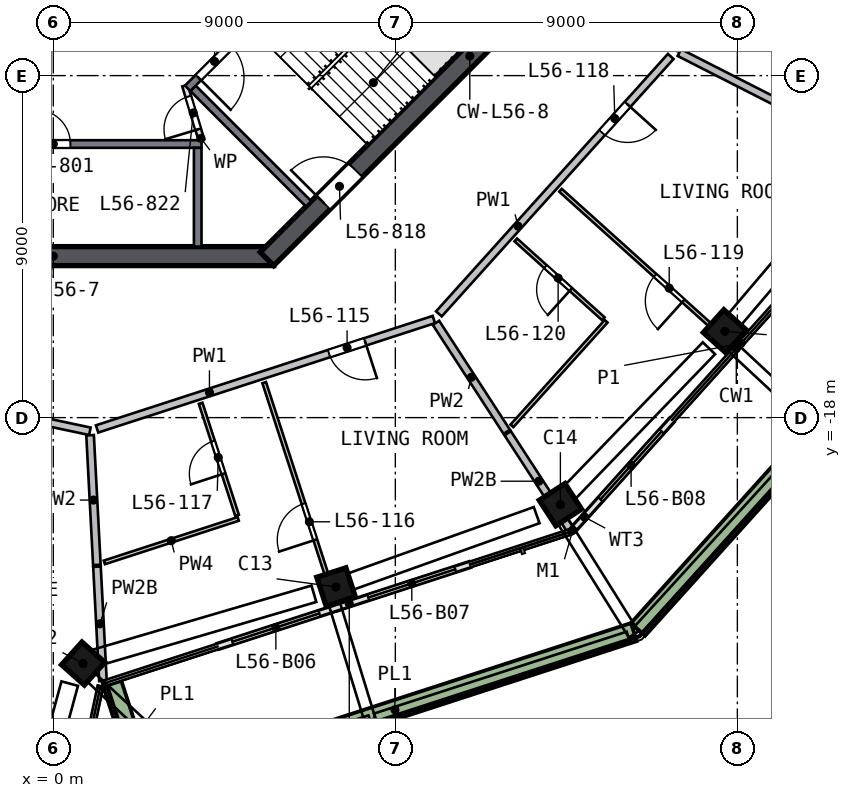
"""IFC4 building model, lengths in metres.
Left out: names, types, materials, properties, quantities, classifications, styles, units other than length and angle.
Written with IfcOpenShell. Run it as: python <this file> out.ifc"""

import sys

from ifc_helpers import new_model, si_unit, direction, frame, frame_2d, origin, origin_2d, place, context, subcontext, project, spatial, rectangle, extrude, element, fill, save


model = new_model("IFC4")
c1 = context("Model", 3, precision=1e-05, world=origin(), true_north=direction((0.0, 1.0)))
c2 = subcontext(c1, "Body", "Model", "MODEL_VIEW")
j1 = project(units=[si_unit("LENGTHUNIT", "METRE"), si_unit("PLANEANGLEUNIT", "RADIAN")], contexts=[c1])
p1 = place(None, origin())
s1 = spatial("IfcSite", under=j1, at=p1, CompositionType="ELEMENT")
p2 = place(p1, origin())
s2 = spatial("IfcBuilding", under=s1, at=p2, CompositionType="ELEMENT")
p3 = place(p2, frame((0.0, 0.0, 230.5)))
s3 = spatial("IfcBuildingStorey", under=s2, at=p3, CompositionType="ELEMENT", Elevation=230.5)
p4 = place(p3, frame((0.645, -24.477, 0.0), z_axis=(0.116377199, 0.004028734, 0.993196917), x_axis=(-0.661978405, -0.745177772, 0.080589573)))
e1 = element("IfcColumn", 1, at=p4, inside=s3, PredefinedType="COLUMN", context=c2, shape_type="SweptSolid", body=[
    extrude(rectangle(XDim=0.8, YDim=0.8, at=origin_2d()), origin(), (0.0, 0.0, 1.0), 3.212),
])
p5 = place(p3, frame((7.311, -22.5, 0.0), z_axis=(0.106771447, 0.03566653, 0.993643677), x_axis=(0.945089515, 0.306813406, -0.112567057)))
e2 = element("IfcColumn", 2, at=p5, inside=s3, PredefinedType="COLUMN", context=c2, shape_type="SweptSolid", body=[
    extrude(rectangle(XDim=0.8, YDim=0.8, at=origin_2d()), origin(), (0.0, 0.0, 1.0), 3.21),
])
p6 = place(p3, frame((13.227, -20.368, 0.0), z_axis=(0.096319996, 0.063782539, 0.99330471), x_axis=(-0.83281179, -0.541368375, 0.115519716)))
e3 = element("IfcColumn", 3, at=p6, inside=s3, PredefinedType="COLUMN", context=c2, shape_type="SweptSolid", body=[
    extrude(rectangle(XDim=0.8, YDim=0.8, at=origin_2d()), origin(), (0.0, 0.0, 1.0), 3.211),
])
p7 = place(p3, frame((17.582, -15.831, 0.0), z_axis=(0.074603375, 0.084261508, 0.993646987), x_axis=(0.664972628, 0.738340463, -0.112537837)))
e4 = element("IfcColumn", 4, at=p7, inside=s3, PredefinedType="COLUMN", context=c2, shape_type="SweptSolid", body=[
    extrude(rectangle(XDim=0.8, YDim=0.8, at=origin_2d()), origin(), (0.0, 0.0, 1.0), 3.21),
])
p8 = place(p3, frame((-5.799, -13.75, 0.0), z_axis=(0.0, 0.0, 1.0), x_axis=(1.0, 0.0, 0.0)))
e5 = element("IfcWall", 5, at=p8, inside=s3, PredefinedType="SHEAR", context=c2, shape_type="SweptSolid", body=[
    extrude(rectangle(XDim=11.598, YDim=0.5, at=frame_2d((5.799, 0.0))), origin(), (0.0, 0.0, 1.0), 3.5),
])
p9 = place(p3, frame((5.622, -13.823, 0.0), z_axis=(0.0, 0.0, 1.0), x_axis=(0.707106781, 0.707106781, 0.0)))
e6 = element("IfcWall", 6, at=p9, inside=s3, PredefinedType="SHEAR", context=c2, shape_type="SweptSolid", body=[
    extrude(rectangle(XDim=11.598, YDim=0.5, at=frame_2d((5.799, 0.0))), origin(), (0.0, 0.0, 1.0), 3.5),
])
p10 = place(p9, frame((2.099, 0.0, 0.0)))
e7 = element("IfcOpeningElement", 7, at=p10, cuts=e6, PredefinedType="OPENING", context=c2, shape_type="SweptSolid", body=[
    extrude(rectangle(XDim=1.2, YDim=2.1, at=frame_2d((0.6, 1.05))), frame((0.0, 0.26, 0.0), z_axis=(0.0, -1.0, 0.0), x_axis=(1.0, 0.0, 0.0)), (0.0, 0.0, 1.0), 0.52),
])
p11 = place(p3, frame((4.334, -24.02, 0.0), z_axis=(0.0, 0.0, 1.0), x_axis=(0.95106016, 0.309005779, 0.0)))
e8 = element("IfcWall", 8, at=p11, inside=s3, PredefinedType="SOLIDWALL", context=c2, shape_type="SweptSolid", body=[
    extrude(rectangle(XDim=3.3, YDim=0.15, at=frame_2d((1.65, 0.0))), origin(), (0.0, 0.0, 1.0), 2.525),
])
p12 = place(p11, frame((0.4, 0.0, 0.0)))
e9 = element("IfcOpeningElement", 9, at=p12, cuts=e8, PredefinedType="OPENING", context=c2, shape_type="SweptSolid", body=[
    extrude(rectangle(XDim=2.4, YDim=2.4, at=frame_2d((1.2, 1.2))), frame((0.0, 0.085, 0.0), z_axis=(0.0, -1.0, 0.0), x_axis=(1.0, 0.0, 0.0)), (0.0, 0.0, 1.0), 0.17),
])
p13 = place(p3, frame((7.473, -23.0, 0.0), z_axis=(0.0, 0.0, 1.0), x_axis=(0.951056609, 0.30901671, 0.0)))
e10 = element("IfcWall", 10, at=p13, inside=s3, PredefinedType="SOLIDWALL", context=c2, shape_type="SweptSolid", body=[
    extrude(rectangle(XDim=3.661, YDim=0.15, at=frame_2d((1.831, 0.0))), origin(), (0.0, 0.0, 1.0), 2.525),
])
p14 = place(p13, frame((0.861, 0.0, 0.0)))
e11 = element("IfcOpeningElement", 11, at=p14, cuts=e10, PredefinedType="OPENING", context=c2, shape_type="SweptSolid", body=[
    extrude(rectangle(XDim=2.4, YDim=2.4, at=frame_2d((1.2, 1.2))), frame((0.0, 0.085, 0.0), z_axis=(0.0, -1.0, 0.0), x_axis=(1.0, 0.0, 0.0)), (0.0, 0.0, 1.0), 0.17),
])
p15 = place(p3, frame((13.689, -20.938, 0.0), z_axis=(0.0, 0.0, 1.0), x_axis=(0.669135801, 0.743140148, 0.0)))
e12 = element("IfcWall", 12, at=p15, inside=s3, PredefinedType="SOLIDWALL", context=c2, shape_type="SweptSolid", body=[
    extrude(rectangle(XDim=3.863, YDim=0.15, at=frame_2d((1.932, 0.0))), origin(), (0.0, 0.0, 1.0), 2.525),
])
p16 = place(p15, frame((1.063, 0.0, 0.0)))
e13 = element("IfcOpeningElement", 13, at=p16, cuts=e12, PredefinedType="OPENING", context=c2, shape_type="SweptSolid", body=[
    extrude(rectangle(XDim=2.4, YDim=2.4, at=frame_2d((1.2, 1.2))), frame((0.0, 0.085, 0.0), z_axis=(0.0, -1.0, 0.0), x_axis=(1.0, 0.0, 0.0)), (0.0, 0.0, 1.0), 0.17),
])
p17 = place(p3, frame((1.552, -25.003, 0.0), z_axis=(0.0, 0.0, 1.0), x_axis=(0.309006691, -0.951059864, 0.0)))
e14 = element("IfcWall", 14, at=p17, inside=s3, PredefinedType="SOLIDWALL", context=c2, shape_type="SweptSolid", body=[
    extrude(rectangle(XDim=3.199, YDim=0.5, at=frame_2d((1.6, 0.0))), origin(), (0.0, 0.0, 1.0), 0.7),
])
p18 = place(p3, frame((2.701, -27.731, 0.0), z_axis=(0.0, 0.0, 1.0), x_axis=(0.951059708, 0.30900717, 0.0)))
e15 = element("IfcWall", 15, at=p18, inside=s3, PredefinedType="SOLIDWALL", context=c2, shape_type="SweptSolid", body=[
    extrude(rectangle(XDim=13.224, YDim=0.5, at=frame_2d((6.612, 0.0))), origin(), (0.0, 0.0, 1.0), 0.7),
])
p19 = place(p3, frame((15.386, -23.574, 0.0), z_axis=(0.0, 0.0, 1.0), x_axis=(0.669134751, 0.743141094, 0.0)))
e16 = element("IfcWall", 16, at=p19, inside=s3, PredefinedType="SOLIDWALL", context=c2, shape_type="SweptSolid", body=[
    extrude(rectangle(XDim=13.723, YDim=0.5, at=frame_2d((6.862, 0.0))), origin(), (0.0, 0.0, 1.0), 0.7),
])
p20 = place(p3, frame((-3.9, -10.8, 0.0), z_axis=(0.0, 0.0, 1.0), x_axis=(1.0, 0.0, 0.0)))
e17 = element("IfcWall", 17, at=p20, inside=s3, PredefinedType="SOLIDWALL", context=c2, shape_type="SweptSolid", body=[
    extrude(rectangle(XDim=7.8, YDim=0.2, at=frame_2d((3.9, 0.0))), origin(), (0.0, 0.0, 1.0), 3.19),
])
p21 = place(p20, frame((3.45, 0.0, 0.0)))
e18 = element("IfcOpeningElement", 18, at=p21, cuts=e17, PredefinedType="OPENING", context=c2, shape_type="SweptSolid", body=[
    extrude(rectangle(XDim=0.9, YDim=2.1, at=frame_2d((0.45, 1.05))), frame((0.0, 0.11, 0.0), z_axis=(0.0, -1.0, 0.0), x_axis=(1.0, 0.0, 0.0)), (0.0, 0.0, 1.0), 0.22),
])
p22 = place(p3, frame((3.8, -10.9, 0.0), z_axis=(0.0, 0.0, 1.0), x_axis=(0.0, -1.0, 0.0)))
e19 = element("IfcWall", 19, at=p22, inside=s3, PredefinedType="SOLIDWALL", context=c2, shape_type="SweptSolid", body=[
    extrude(rectangle(XDim=2.6, YDim=0.2, at=frame_2d((1.3, 0.0))), origin(), (0.0, 0.0, 1.0), 3.19),
])
p23 = place(p3, frame((9.629, -3.24, 0.0), z_axis=(0.0, 0.0, 1.0), x_axis=(-0.707120946, -0.707092617, 0.0)))
e20 = element("IfcWall", 20, at=p23, inside=s3, PredefinedType="SOLIDWALL", context=c2, shape_type="SweptSolid", body=[
    extrude(rectangle(XDim=8.618, YDim=0.2, at=frame_2d((4.309, 0.0))), origin(), (0.0, 0.0, 1.0), 3.19),
])
p24 = place(p23, frame((7.018, 0.0, 0.0)))
e21 = element("IfcOpeningElement", 21, at=p24, cuts=e20, PredefinedType="OPENING", context=c2, shape_type="SweptSolid", body=[
    extrude(rectangle(XDim=1.2, YDim=2.1, at=frame_2d((0.6, 1.05))), frame((0.0, 0.11, 0.0), z_axis=(0.0, -1.0, 0.0), x_axis=(1.0, 0.0, 0.0)), (0.0, 0.0, 1.0), 0.22),
])
p25 = place(p3, frame((3.677, -9.334, 0.0), z_axis=(0.0, 0.0, 1.0), x_axis=(0.707078393, -0.707135168, 0.0)))
e22 = element("IfcWall", 22, at=p25, inside=s3, PredefinedType="SOLIDWALL", context=c2, shape_type="SweptSolid", body=[
    extrude(rectangle(XDim=4.3, YDim=0.2, at=frame_2d((2.15, 0.0))), origin(), (0.0, 0.0, 1.0), 3.19),
])
p26 = place(p3, frame((3.9, -10.7, 0.0), z_axis=(0.0, 0.0, 1.0), x_axis=(-0.289808785, 0.957084567, 0.0)))
e23 = element("IfcWall", 23, at=p26, inside=s3, PredefinedType="PARTITIONING", context=c2, shape_type="SweptSolid", body=[
    extrude(rectangle(XDim=1.501, YDim=0.15, at=frame_2d((0.75, 0.0))), origin(), (0.0, 0.0, 1.0), 3.19),
])
p27 = place(p26, frame((0.301, 0.0, 0.0)))
e24 = element("IfcOpeningElement", 24, at=p27, cuts=e23, PredefinedType="OPENING", context=c2, shape_type="SweptSolid", body=[
    extrude(rectangle(XDim=0.9, YDim=2.1, at=frame_2d((0.45, 1.05))), frame((0.0, 0.085, 0.0), z_axis=(0.0, -1.0, 0.0), x_axis=(1.0, 0.0, 0.0)), (0.0, 0.0, 1.0), 0.17),
])
p28 = place(p3, frame((0.962, -18.36, 0.0), z_axis=(0.0, 0.0, 1.0), x_axis=(-0.978149461, 0.207902938, 0.0)))
e25 = element("IfcWall", 25, at=p28, inside=s3, PredefinedType="SOLIDWALL", context=c2, shape_type="SweptSolid", body=[
    extrude(rectangle(XDim=9.517, YDim=0.2, at=frame_2d((4.758, 0.0))), origin(), (0.0, 0.0, 1.0), 3.19),
])
p29 = place(p28, frame((3.84, 0.0, 0.0)))
e26 = element("IfcOpeningElement", 26, at=p29, cuts=e25, PredefinedType="OPENING", context=c2, shape_type="SweptSolid", body=[
    extrude(rectangle(XDim=1.8, YDim=2.1, at=frame_2d((0.9, 1.05))), frame((0.0, 0.11, 0.0), z_axis=(0.0, -1.0, 0.0), x_axis=(1.0, 0.0, 0.0)), (0.0, 0.0, 1.0), 0.22),
])
p30 = place(p3, frame((10.013, -15.419, 0.0), z_axis=(0.0, 0.0, 1.0), x_axis=(-0.951053709, -0.309025635, 0.0)))
e27 = element("IfcWall", 27, at=p30, inside=s3, PredefinedType="SOLIDWALL", context=c2, shape_type="SweptSolid", body=[
    extrude(rectangle(XDim=9.317, YDim=0.2, at=frame_2d((4.658, 0.0))), origin(), (0.0, 0.0, 1.0), 3.19),
])
p31 = place(p30, frame((1.9, 0.0, 0.0)))
e28 = element("IfcOpeningElement", 28, at=p31, cuts=e27, PredefinedType="OPENING", context=c2, shape_type="SweptSolid", body=[
    extrude(rectangle(XDim=1.0, YDim=2.1, at=frame_2d((0.5, 1.05))), frame((0.0, 0.11, 0.0), z_axis=(0.0, -1.0, 0.0), x_axis=(1.0, 0.0, 0.0)), (0.0, 0.0, 1.0), 0.22),
])
p32 = place(p3, frame((16.247, -8.495, 0.0), z_axis=(0.0, 0.0, 1.0), x_axis=(-0.669127468, -0.743147652, 0.0)))
e29 = element("IfcWall", 29, at=p32, inside=s3, PredefinedType="SOLIDWALL", context=c2, shape_type="SweptSolid", body=[
    extrude(rectangle(XDim=9.116, YDim=0.2, at=frame_2d((4.558, 0.0))), origin(), (0.0, 0.0, 1.0), 3.19),
])
p33 = place(p32, frame((1.7, 0.0, 0.0)))
e30 = element("IfcOpeningElement", 30, at=p33, cuts=e29, PredefinedType="OPENING", context=c2, shape_type="SweptSolid", body=[
    extrude(rectangle(XDim=1.0, YDim=2.1, at=frame_2d((0.5, 1.05))), frame((0.0, 0.11, 0.0), z_axis=(0.0, -1.0, 0.0), x_axis=(1.0, 0.0, 0.0)), (0.0, 0.0, 1.0), 0.22),
])
p34 = place(p3, frame((0.968, -18.463, 0.0), z_axis=(0.0, 0.0, 1.0), x_axis=(0.05234892, -0.998628855, 0.0)))
e31 = element("IfcWall", 31, at=p34, inside=s3, PredefinedType="SOLIDWALL", context=c2, shape_type="SweptSolid", body=[
    extrude(rectangle(XDim=3.418, YDim=0.2, at=frame_2d((1.709, 0.0))), origin(), (0.0, 0.0, 1.0), 3.19),
])
p35 = place(p3, frame((1.149, -21.923, 0.0), z_axis=(0.0, 0.0, 1.0), x_axis=(0.05229076, -0.998631902, 0.0)))
e32 = element("IfcWall", 32, at=p35, inside=s3, PredefinedType="SOLIDWALL", context=c2, shape_type="SweptSolid", body=[
    extrude(rectangle(XDim=3.011, YDim=0.2, at=frame_2d((1.506, 0.0))), origin(), (0.0, 0.0, 1.0), 2.69),
])
p36 = place(p3, frame((10.07, -15.506, 0.0), z_axis=(0.0, 0.0, 1.0), x_axis=(0.544639368, -0.838670352, 0.0)))
e33 = element("IfcWall", 33, at=p36, inside=s3, PredefinedType="SOLIDWALL", context=c2, shape_type="SweptSolid", body=[
    extrude(rectangle(XDim=3.418, YDim=0.2, at=frame_2d((1.709, 0.0))), origin(), (0.0, 0.0, 1.0), 3.19),
])
p37 = place(p3, frame((11.956, -18.411, 0.0), z_axis=(0.0, 0.0, 1.0), x_axis=(0.544632104, -0.838675069, 0.0)))
e34 = element("IfcWall", 34, at=p37, inside=s3, PredefinedType="SOLIDWALL", context=c2, shape_type="SweptSolid", body=[
    extrude(rectangle(XDim=3.011, YDim=0.2, at=frame_2d((1.506, 0.0))), origin(), (0.0, 0.0, 1.0), 2.69),
])
p38 = place(p3, frame((16.473, -8.394, 0.0), z_axis=(0.0, 0.0, 1.0), x_axis=(0.891008422, -0.453986774, 0.0)))
e35 = element("IfcWall", 35, at=p38, inside=s3, PredefinedType="SOLIDWALL", context=c2, shape_type="SweptSolid", body=[
    extrude(rectangle(XDim=6.476, YDim=0.2, at=frame_2d((3.238, 0.0))), origin(), (0.0, 0.0, 1.0), 3.19),
])
p39 = place(p3, frame((1.343, -21.811, 0.0), z_axis=(0.0, 0.0, 1.0), x_axis=(0.951042303, 0.309060736, 0.0)))
e36 = element("IfcWall", 36, at=p39, inside=s3, PredefinedType="PARTITIONING", context=c2, shape_type="SweptSolid", body=[
    extrude(rectangle(XDim=3.704, YDim=0.1, at=frame_2d((1.852, 0.0))), origin(), (0.0, 0.0, 1.0), 3.19),
])
p40 = place(p3, frame((4.835, -20.571, 0.0), z_axis=(0.0, 0.0, 1.0), x_axis=(-0.30903621, 0.951050273, 0.0)))
e37 = element("IfcWall", 37, at=p40, inside=s3, PredefinedType="PARTITIONING", context=c2, shape_type="SweptSolid", body=[
    extrude(rectangle(XDim=3.1, YDim=0.1, at=frame_2d((1.55, 0.0))), origin(), (0.0, 0.0, 1.0), 3.19),
])
p41 = place(p40, frame((1.15, 0.0, 0.0)))
e38 = element("IfcOpeningElement", 38, at=p41, cuts=e37, PredefinedType="OPENING", context=c2, shape_type="SweptSolid", body=[
    extrude(rectangle(XDim=0.9, YDim=2.1, at=frame_2d((0.45, 1.05))), frame((0.0, 0.06, 0.0), z_axis=(0.0, -1.0, 0.0), x_axis=(1.0, 0.0, 0.0)), (0.0, 0.0, 1.0), 0.12),
])
p42 = place(p3, frame((7.45, -22.928, 0.0), z_axis=(0.0, 0.0, 1.0), x_axis=(-0.309037601, 0.95104982, 0.0)))
e39 = element("IfcWall", 39, at=p42, inside=s3, PredefinedType="PARTITIONING", context=c2, shape_type="SweptSolid", body=[
    extrude(rectangle(XDim=6.15, YDim=0.1, at=frame_2d((3.075, 0.0))), origin(), (0.0, 0.0, 1.0), 3.19),
])
p43 = place(p42, frame((1.8, 0.0, 0.0)))
e40 = element("IfcOpeningElement", 40, at=p43, cuts=e39, PredefinedType="OPENING", context=c2, shape_type="SweptSolid", body=[
    extrude(rectangle(XDim=1.0, YDim=2.1, at=frame_2d((0.5, 1.05))), frame((0.0, 0.06, 0.0), z_axis=(0.0, -1.0, 0.0), x_axis=(1.0, 0.0, 0.0)), (0.0, 0.0, 1.0), 0.12),
])
p44 = place(p3, frame((12.069, -18.217, 0.0), z_axis=(0.0, 0.0, 1.0), x_axis=(0.669128583, 0.743146648, 0.0)))
e41 = element("IfcWall", 41, at=p44, inside=s3, PredefinedType="PARTITIONING", context=c2, shape_type="SweptSolid", body=[
    extrude(rectangle(XDim=3.704, YDim=0.1, at=frame_2d((1.852, 0.0))), origin(), (0.0, 0.0, 1.0), 3.19),
])
p45 = place(p3, frame((14.473, -15.397, 0.0), z_axis=(0.0, 0.0, 1.0), x_axis=(-0.74315315, 0.669121361, 0.0)))
e42 = element("IfcWall", 42, at=p45, inside=s3, PredefinedType="PARTITIONING", context=c2, shape_type="SweptSolid", body=[
    extrude(rectangle(XDim=3.1, YDim=0.1, at=frame_2d((1.55, 0.0))), origin(), (0.0, 0.0, 1.0), 3.19),
])
p46 = place(p45, frame((1.15, 0.0, 0.0)))
e43 = element("IfcOpeningElement", 43, at=p46, cuts=e42, PredefinedType="OPENING", context=c2, shape_type="SweptSolid", body=[
    extrude(rectangle(XDim=0.9, YDim=2.1, at=frame_2d((0.45, 1.05))), frame((0.0, 0.06, 0.0), z_axis=(0.0, -1.0, 0.0), x_axis=(1.0, 0.0, 0.0)), (0.0, 0.0, 1.0), 0.12),
])
p47 = place(p3, frame((17.916, -16.132, 0.0), z_axis=(0.0, 0.0, 1.0), x_axis=(-0.743155953, 0.669118247, 0.0)))
e44 = element("IfcWall", 44, at=p47, inside=s3, PredefinedType="PARTITIONING", context=c2, shape_type="SweptSolid", body=[
    extrude(rectangle(XDim=6.15, YDim=0.1, at=frame_2d((3.075, 0.0))), origin(), (0.0, 0.0, 1.0), 3.19),
])
p48 = place(p47, frame((1.8, 0.0, 0.0)))
e45 = element("IfcOpeningElement", 45, at=p48, cuts=e44, PredefinedType="OPENING", context=c2, shape_type="SweptSolid", body=[
    extrude(rectangle(XDim=1.0, YDim=2.1, at=frame_2d((0.5, 1.05))), frame((0.0, 0.06, 0.0), z_axis=(0.0, -1.0, 0.0), x_axis=(1.0, 0.0, 0.0)), (0.0, 0.0, 1.0), 0.12),
])
p49 = place(p12, origin())
e46 = element("IfcDoor", 46, at=p49, inside=s3, OperationType="SLIDING_TO_RIGHT", PredefinedType="DOOR", context=c2, shape_type="SweptSolid", body=[
    extrude(rectangle(XDim=2.4, YDim=2.4, at=frame_2d((1.2, 1.2))), frame((0.0, 0.025, 0.0), z_axis=(0.0, -1.0, 0.0), x_axis=(1.0, 0.0, 0.0)), (0.0, 0.0, 1.0), 0.05),
])
fill(e9, e46)
p50 = place(p14, origin())
e47 = element("IfcDoor", 47, at=p50, inside=s3, OperationType="SLIDING_TO_LEFT", PredefinedType="DOOR", context=c2, shape_type="SweptSolid", body=[
    extrude(rectangle(XDim=2.4, YDim=2.4, at=frame_2d((1.2, 1.2))), frame((0.0, 0.025, 0.0), z_axis=(0.0, -1.0, 0.0), x_axis=(1.0, 0.0, 0.0)), (0.0, 0.0, 1.0), 0.05),
])
fill(e11, e47)
p51 = place(p16, origin())
e48 = element("IfcDoor", 48, at=p51, inside=s3, OperationType="SLIDING_TO_LEFT", PredefinedType="DOOR", context=c2, shape_type="SweptSolid", body=[
    extrude(rectangle(XDim=2.4, YDim=2.4, at=frame_2d((1.2, 1.2))), frame((0.0, 0.025, 0.0), z_axis=(0.0, -1.0, 0.0), x_axis=(1.0, 0.0, 0.0)), (0.0, 0.0, 1.0), 0.05),
])
fill(e13, e48)
p52 = place(p21, origin())
e49 = element("IfcDoor", 49, at=p52, inside=s3, OperationType="SINGLE_SWING_LEFT", PredefinedType="DOOR", context=c2, shape_type="SweptSolid", body=[
    extrude(rectangle(XDim=0.9, YDim=2.1, at=frame_2d((0.45, 1.05))), frame((0.0, 0.025, 0.0), z_axis=(0.0, -1.0, 0.0), x_axis=(1.0, 0.0, 0.0)), (0.0, 0.0, 1.0), 0.05),
])
fill(e18, e49)
p53 = place(p24, origin())
e50 = element("IfcDoor", 50, at=p53, inside=s3, OperationType="SINGLE_SWING_RIGHT", PredefinedType="DOOR", context=c2, shape_type="SweptSolid", body=[
    extrude(rectangle(XDim=1.2, YDim=2.1, at=frame_2d((0.6, 1.05))), frame((0.0, 0.025, 0.0), z_axis=(0.0, -1.0, 0.0), x_axis=(1.0, 0.0, 0.0)), (0.0, 0.0, 1.0), 0.05),
])
fill(e21, e50)
p54 = place(p10, origin())
e51 = element("IfcDoor", 51, at=p54, inside=s3, OperationType="SINGLE_SWING_LEFT", PredefinedType="DOOR", context=c2, shape_type="SweptSolid", body=[
    extrude(rectangle(XDim=1.2, YDim=2.1, at=frame_2d((0.6, 1.05))), frame((0.0, 0.025, 0.0), z_axis=(0.0, -1.0, 0.0), x_axis=(1.0, 0.0, 0.0)), (0.0, 0.0, 1.0), 0.05),
])
fill(e7, e51)
p55 = place(p27, origin())
e52 = element("IfcDoor", 52, at=p55, inside=s3, OperationType="SINGLE_SWING_LEFT", PredefinedType="DOOR", context=c2, shape_type="SweptSolid", body=[
    extrude(rectangle(XDim=0.9, YDim=2.1, at=frame_2d((0.45, 1.05))), frame((0.0, 0.025, 0.0), z_axis=(0.0, -1.0, 0.0), x_axis=(1.0, 0.0, 0.0)), (0.0, 0.0, 1.0), 0.05),
])
fill(e24, e52)
p56 = place(p31, origin())
e53 = element("IfcDoor", 53, at=p56, inside=s3, OperationType="SINGLE_SWING_LEFT", PredefinedType="DOOR", context=c2, shape_type="SweptSolid", body=[
    extrude(rectangle(XDim=1.0, YDim=2.1, at=frame_2d((0.5, 1.05))), frame((0.0, 0.025, 0.0), z_axis=(0.0, -1.0, 0.0), x_axis=(1.0, 0.0, 0.0)), (0.0, 0.0, 1.0), 0.05),
])
fill(e28, e53)
p57 = place(p43, origin())
e54 = element("IfcDoor", 54, at=p57, inside=s3, OperationType="SINGLE_SWING_LEFT", PredefinedType="DOOR", context=c2, shape_type="SweptSolid", body=[
    extrude(rectangle(XDim=1.0, YDim=2.1, at=frame_2d((0.5, 1.05))), frame((0.0, 0.025, 0.0), z_axis=(0.0, -1.0, 0.0), x_axis=(1.0, 0.0, 0.0)), (0.0, 0.0, 1.0), 0.05),
])
fill(e40, e54)
p58 = place(p41, origin())
e55 = element("IfcDoor", 55, at=p58, inside=s3, OperationType="SINGLE_SWING_LEFT", PredefinedType="DOOR", context=c2, shape_type="SweptSolid", body=[
    extrude(rectangle(XDim=0.9, YDim=2.1, at=frame_2d((0.45, 1.05))), frame((0.0, 0.025, 0.0), z_axis=(0.0, -1.0, 0.0), x_axis=(1.0, 0.0, 0.0)), (0.0, 0.0, 1.0), 0.05),
])
fill(e38, e55)
p59 = place(p33, origin())
e56 = element("IfcDoor", 56, at=p59, inside=s3, OperationType="SINGLE_SWING_LEFT", PredefinedType="DOOR", context=c2, shape_type="SweptSolid", body=[
    extrude(rectangle(XDim=1.0, YDim=2.1, at=frame_2d((0.5, 1.05))), frame((0.0, 0.025, 0.0), z_axis=(0.0, -1.0, 0.0), x_axis=(1.0, 0.0, 0.0)), (0.0, 0.0, 1.0), 0.05),
])
fill(e30, e56)
p60 = place(p48, origin())
e57 = element("IfcDoor", 57, at=p60, inside=s3, OperationType="SINGLE_SWING_LEFT", PredefinedType="DOOR", context=c2, shape_type="SweptSolid", body=[
    extrude(rectangle(XDim=1.0, YDim=2.1, at=frame_2d((0.5, 1.05))), frame((0.0, 0.025, 0.0), z_axis=(0.0, -1.0, 0.0), x_axis=(1.0, 0.0, 0.0)), (0.0, 0.0, 1.0), 0.05),
])
fill(e45, e57)
p61 = place(p46, origin())
e58 = element("IfcDoor", 58, at=p61, inside=s3, OperationType="SINGLE_SWING_LEFT", PredefinedType="DOOR", context=c2, shape_type="SweptSolid", body=[
    extrude(rectangle(XDim=0.9, YDim=2.1, at=frame_2d((0.45, 1.05))), frame((0.0, 0.025, 0.0), z_axis=(0.0, -1.0, 0.0), x_axis=(1.0, 0.0, 0.0)), (0.0, 0.0, 1.0), 0.05),
])
fill(e43, e58)
save(model, sys.argv[1])
